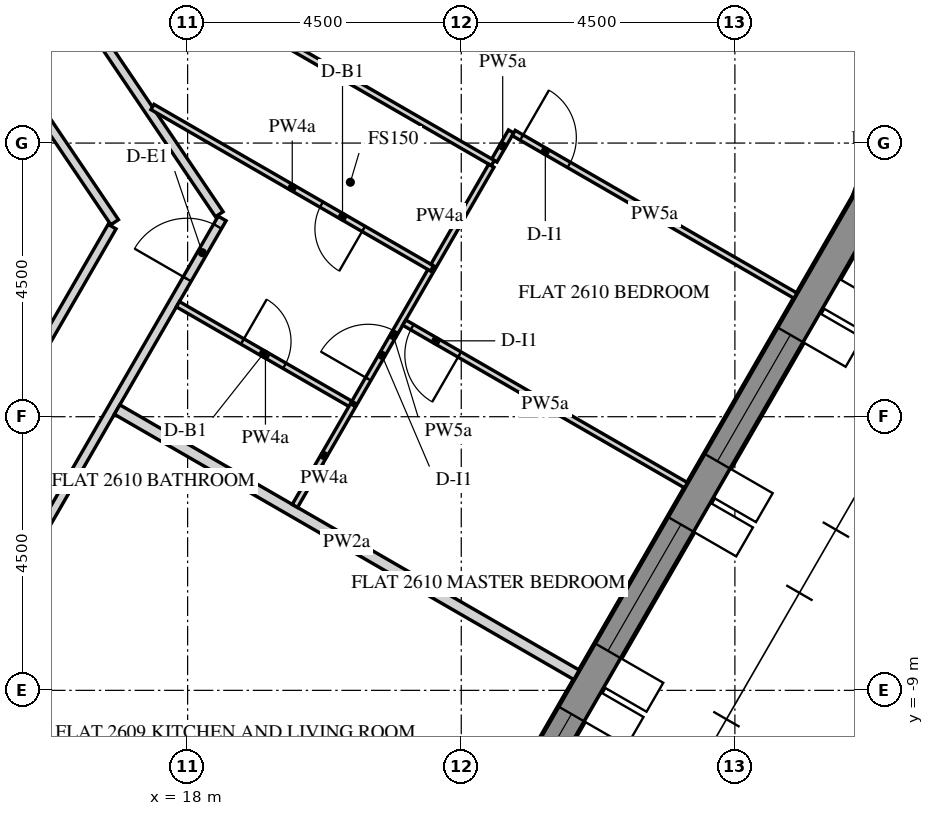
"""IFC4 building model, lengths in metres.
Left out: names, types, materials, properties, quantities, classifications, styles, units other than length and angle.
Written with IfcOpenShell. Run it as: python <this file> out.ifc"""

import sys

from ifc_helpers import new_model, si_unit, direction, frame, frame_2d, origin, place, context, subcontext, project, spatial, polyline, rectangle, outline, extrude, element, fill, save


model = new_model("IFC4")
c1 = context("Model", 3, precision=1e-05, world=origin(), true_north=direction((0.0, 1.0)))
c2 = subcontext(c1, "Body", "Model", "MODEL_VIEW")
j1 = project(units=[si_unit("LENGTHUNIT", "METRE"), si_unit("PLANEANGLEUNIT", "RADIAN")], contexts=[c1])
p1 = place(None, origin())
s1 = spatial("IfcSite", under=j1, at=p1, CompositionType="ELEMENT")
p2 = place(p1, origin())
s2 = spatial("IfcBuilding", under=s1, at=p2, CompositionType="ELEMENT")
p3 = place(p2, frame((0.0, 0.0, 326.4)))
s3 = spatial("IfcBuildingStorey", under=s2, at=p3, CompositionType="ELEMENT", Elevation=326.4)
p4 = place(p3, frame((16.451, -23.005, -0.15), z_axis=(0.0, 0.0, 1.0), x_axis=(0.500003737743, 0.866023245787, 0.0)))
e1 = element("IfcWall", 1, at=p4, inside=s3, PredefinedType="SOLIDWALL", context=c2, shape_type="SweptSolid", body=[
    extrude(outline(polyline([(-0.021, -0.25), (25.468, -0.25), (25.421, 0.25), (0.021, 0.25), (-0.021, -0.25)])), origin(), (0.0, 0.0, 1.0), 3.9),
])
p5 = place(p4, frame((2.522, 0.0, 0.75)))
e2 = element("IfcOpeningElement", 2, at=p5, cuts=e1, PredefinedType="OPENING", context=c2, shape_type="SweptSolid", body=[
    extrude(rectangle(XDim=2.4, YDim=2.7, at=frame_2d((1.2, 1.35))), frame((0.0, 0.26, 0.0), z_axis=(0.0, -1.0, 0.0), x_axis=(1.0, 0.0, 0.0)), (0.0, 0.0, 1.0), 0.52),
])
p6 = place(p4, frame((6.122, 0.0, 0.75)))
e3 = element("IfcOpeningElement", 3, at=p6, cuts=e1, PredefinedType="OPENING", context=c2, shape_type="SweptSolid", body=[
    extrude(rectangle(XDim=2.4, YDim=2.7, at=frame_2d((1.2, 1.35))), frame((0.0, 0.26, 0.0), z_axis=(0.0, -1.0, 0.0), x_axis=(1.0, 0.0, 0.0)), (0.0, 0.0, 1.0), 0.52),
])
p7 = place(p4, frame((9.722, 0.0, 0.75)))
e4 = element("IfcOpeningElement", 4, at=p7, cuts=e1, PredefinedType="OPENING", context=c2, shape_type="SweptSolid", body=[
    extrude(rectangle(XDim=2.4, YDim=2.7, at=frame_2d((1.2, 1.35))), frame((0.0, 0.26, 0.0), z_axis=(0.0, -1.0, 0.0), x_axis=(1.0, 0.0, 0.0)), (0.0, 0.0, 1.0), 0.52),
])
p8 = place(p4, frame((13.323, 0.0, 0.75)))
e5 = element("IfcOpeningElement", 5, at=p8, cuts=e1, PredefinedType="OPENING", context=c2, shape_type="SweptSolid", body=[
    extrude(rectangle(XDim=2.4, YDim=2.7, at=frame_2d((1.2, 1.35))), frame((0.0, 0.26, 0.0), z_axis=(0.0, -1.0, 0.0), x_axis=(1.0, 0.0, 0.0)), (0.0, 0.0, 1.0), 0.52),
])
p9 = place(p4, frame((16.922, 0.0, 0.75)))
e6 = element("IfcOpeningElement", 6, at=p9, cuts=e1, PredefinedType="OPENING", context=c2, shape_type="SweptSolid", body=[
    extrude(rectangle(XDim=2.4, YDim=2.7, at=frame_2d((1.2, 1.35))), frame((0.0, 0.26, 0.0), z_axis=(0.0, -1.0, 0.0), x_axis=(1.0, 0.0, 0.0)), (0.0, 0.0, 1.0), 0.52),
])
p10 = place(p4, frame((20.522, 0.0, 0.75)))
e7 = element("IfcOpeningElement", 7, at=p10, cuts=e1, PredefinedType="OPENING", context=c2, shape_type="SweptSolid", body=[
    extrude(rectangle(XDim=2.4, YDim=2.7, at=frame_2d((1.2, 1.35))), frame((0.0, 0.26, 0.0), z_axis=(0.0, -1.0, 0.0), x_axis=(1.0, 0.0, 0.0)), (0.0, 0.0, 1.0), 0.52),
])
p11 = place(p3, frame((29.174, -0.97, -0.15), z_axis=(0.0, 0.0, 1.0), x_axis=(0.330961348063, 0.943644311215, 0.0)))
e8 = element("IfcWall", 8, at=p11, inside=s3, PredefinedType="SOLIDWALL", context=c2, shape_type="SweptSolid", body=[
    extrude(outline(polyline([(-0.023, -0.25), (1.435, -0.25), (1.341, 0.25), (0.023, 0.25), (-0.023, -0.25)])), origin(), (0.0, 0.0, 1.0), 3.9),
])
p12 = place(p3, frame((11.229, -13.951, 0.0), z_axis=(0.0, 0.0, 1.0), x_axis=(0.499997948852, 0.866026588012, 0.0)))
e9 = element("IfcWall", 9, at=p12, inside=s3, PredefinedType="PARTITIONING", context=c2, shape_type="SweptSolid", body=[
    extrude(rectangle(XDim=14.677, YDim=0.15, at=frame_2d((7.339, 0.0))), origin(), (0.0, 0.0, 1.0), 2.838),
])
p13 = place(p12, frame((0.4, 0.0, 0.0)))
e10 = element("IfcOpeningElement", 10, at=p13, cuts=e9, PredefinedType="OPENING", context=c2, shape_type="SweptSolid", body=[
    extrude(rectangle(XDim=1.0, YDim=2.1, at=frame_2d((0.5, 1.05))), frame((0.0, 0.085, 0.0), z_axis=(0.0, -1.0, 0.0), x_axis=(1.0, 0.0, 0.0)), (0.0, 0.0, 1.0), 0.17),
])
p14 = place(p12, frame((13.527, 0.0, 0.0)))
e11 = element("IfcOpeningElement", 11, at=p14, cuts=e9, PredefinedType="OPENING", context=c2, shape_type="SweptSolid", body=[
    extrude(rectangle(XDim=1.0, YDim=2.1, at=frame_2d((0.5, 1.05))), frame((0.0, 0.085, 0.0), z_axis=(0.0, -1.0, 0.0), x_axis=(1.0, 0.0, 0.0)), (0.0, 0.0, 1.0), 0.17),
])
p15 = place(p3, frame((18.521, -1.171, 0.0), z_axis=(0.0, 0.0, 1.0), x_axis=(-0.559191021435, 0.829038842001, 0.0)))
e12 = element("IfcWall", 12, at=p15, inside=s3, PredefinedType="PARTITIONING", context=c2, shape_type="SweptSolid", body=[
    extrude(rectangle(XDim=16.605, YDim=0.15, at=frame_2d((8.303, 0.0))), origin(), (0.0, 0.0, 1.0), 2.838),
])
p16 = place(p15, frame((9.703, 0.0, 0.0)))
e13 = element("IfcOpeningElement", 13, at=p16, cuts=e12, PredefinedType="OPENING", context=c2, shape_type="SweptSolid", body=[
    extrude(rectangle(XDim=1.0, YDim=2.1, at=frame_2d((0.5, 1.05))), frame((0.0, 0.085, 0.0), z_axis=(0.0, -1.0, 0.0), x_axis=(1.0, 0.0, 0.0)), (0.0, 0.0, 1.0), 0.17),
])
p17 = place(p3, frame((12.106, 5.657, 0.0), z_axis=(0.0, 0.0, 1.0), x_axis=(0.559202573837, -0.829031049728, 0.0)))
e14 = element("IfcWall", 14, at=p17, inside=s3, PredefinedType="PARTITIONING", context=c2, shape_type="SweptSolid", body=[
    extrude(rectangle(XDim=8.394, YDim=0.15, at=frame_2d((4.197, 0.0))), origin(), (0.0, 0.0, 1.0), 2.838),
])
p18 = place(p17, frame((3.747, 0.0, 0.0)))
e15 = element("IfcOpeningElement", 15, at=p18, cuts=e14, PredefinedType="OPENING", context=c2, shape_type="SweptSolid", body=[
    extrude(rectangle(XDim=0.9, YDim=2.1, at=frame_2d((0.45, 1.05))), frame((0.0, 0.085, 0.0), z_axis=(0.0, -1.0, 0.0), x_axis=(1.0, 0.0, 0.0)), (0.0, 0.0, 1.0), 0.17),
])
p19 = place(p3, frame((16.758, -1.374, 0.0), z_axis=(0.0, 0.0, 1.0), x_axis=(-0.499980689202, -0.866036552592, 0.0)))
e16 = element("IfcWall", 16, at=p19, inside=s3, PredefinedType="PARTITIONING", context=c2, shape_type="SweptSolid", body=[
    extrude(rectangle(XDim=6.111, YDim=0.15, at=frame_2d((3.055, 0.0))), origin(), (0.0, 0.0, 1.0), 2.838),
])
p20 = place(p3, frame((24.396, -8.745, 0.0), z_axis=(0.0, 0.0, 1.0), x_axis=(-0.866018297078, 0.500012308975, 0.0)))
e17 = element("IfcWall", 17, at=p20, inside=s3, PredefinedType="PARTITIONING", context=c2, shape_type="SweptSolid", body=[
    extrude(rectangle(XDim=8.725, YDim=0.18, at=frame_2d((4.362, 0.0))), origin(), (0.0, 0.0, 1.0), 2.838),
])
p21 = place(p3, frame((23.043, -0.287, 0.0), z_axis=(0.0, 0.0, 1.0), x_axis=(0.500181810019, 0.865920410272, 0.0)))
e18 = element("IfcWall", 18, at=p21, inside=s3, PredefinedType="PARTITIONING", context=c2, shape_type="SweptSolid", body=[
    extrude(rectangle(XDim=0.552, YDim=0.1, at=frame_2d((0.276, 0.0))), origin(), (0.0, 0.0, 1.0), 2.838),
])
p22 = place(p3, frame((23.363, 0.166, 0.0), z_axis=(0.0, 0.0, 1.0), x_axis=(0.866024483152, -0.500001594578, 0.0)))
e19 = element("IfcWall", 19, at=p22, inside=s3, PredefinedType="PARTITIONING", context=c2, shape_type="SweptSolid", body=[
    extrude(rectangle(XDim=5.35, YDim=0.1, at=frame_2d((2.675, 0.0))), origin(), (0.0, 0.0, 1.0), 2.838),
])
p23 = place(p22, frame((0.15, 0.0, 0.0)))
e20 = element("IfcOpeningElement", 20, at=p23, cuts=e19, PredefinedType="OPENING", context=c2, shape_type="SweptSolid", body=[
    extrude(rectangle(XDim=0.9, YDim=2.1, at=frame_2d((0.45, 1.05))), frame((0.0, 0.06, 0.0), z_axis=(0.0, -1.0, 0.0), x_axis=(1.0, 0.0, 0.0)), (0.0, 0.0, 1.0), 0.12),
])
p24 = place(p3, frame((14.896, 4.361, 0.0), z_axis=(0.0, 0.0, 1.0), x_axis=(0.866020874699, -0.500007844523, 0.0)))
e21 = element("IfcWall", 21, at=p24, inside=s3, PredefinedType="PARTITIONING", context=c2, shape_type="SweptSolid", body=[
    extrude(rectangle(XDim=9.38, YDim=0.1, at=frame_2d((4.69, 0.0))), origin(), (0.0, 0.0, 1.0), 2.838),
])
p25 = place(p3, frame((17.84, -2.65, 0.0), z_axis=(0.0, 0.0, 1.0), x_axis=(0.866002163101, -0.500040251884, 0.0)))
e22 = element("IfcWall", 22, at=p25, inside=s3, PredefinedType="PARTITIONING", context=c2, shape_type="SweptSolid", body=[
    extrude(rectangle(XDim=3.325, YDim=0.1, at=frame_2d((1.663, 0.0))), origin(), (0.0, 0.0, 1.0), 2.838),
])
p26 = place(p25, frame((1.225, 0.0, 0.0)))
e23 = element("IfcOpeningElement", 23, at=p26, cuts=e22, PredefinedType="OPENING", context=c2, shape_type="SweptSolid", body=[
    extrude(rectangle(XDim=0.8, YDim=2.1, at=frame_2d((0.4, 1.05))), frame((0.0, 0.06, 0.0), z_axis=(0.0, -1.0, 0.0), x_axis=(1.0, 0.0, 0.0)), (0.0, 0.0, 1.0), 0.12),
])
p27 = place(p3, frame((20.743, -4.271, 0.0), z_axis=(0.0, 0.0, 1.0), x_axis=(0.500014808323, 0.866016854026, 0.0)))
e24 = element("IfcWall", 24, at=p27, inside=s3, PredefinedType="PARTITIONING", context=c2, shape_type="SweptSolid", body=[
    extrude(rectangle(XDim=2.554, YDim=0.1, at=frame_2d((1.277, 0.0))), origin(), (0.0, 0.0, 1.0), 2.838),
])
p28 = place(p27, frame((0.452, 0.0, 0.0)))
e25 = element("IfcOpeningElement", 25, at=p28, cuts=e24, PredefinedType="OPENING", context=c2, shape_type="SweptSolid", body=[
    extrude(rectangle(XDim=0.9, YDim=2.1, at=frame_2d((0.45, 1.05))), frame((0.0, 0.06, 0.0), z_axis=(0.0, -1.0, 0.0), x_axis=(1.0, 0.0, 0.0)), (0.0, 0.0, 1.0), 0.12),
])
p29 = place(p3, frame((22.02, -2.061, 0.0), z_axis=(0.0, 0.0, 1.0), x_axis=(-0.866041630335, 0.499971893737, 0.0)))
e26 = element("IfcWall", 26, at=p29, inside=s3, PredefinedType="PARTITIONING", context=c2, shape_type="SweptSolid", body=[
    extrude(rectangle(XDim=5.309, YDim=0.1, at=frame_2d((2.655, 0.0))), origin(), (0.0, 0.0, 1.0), 2.838),
])
p30 = place(p29, frame((1.3, 0.0, 0.0)))
e27 = element("IfcOpeningElement", 27, at=p30, cuts=e26, PredefinedType="OPENING", context=c2, shape_type="SweptSolid", body=[
    extrude(rectangle(XDim=0.8, YDim=2.1, at=frame_2d((0.4, 1.05))), frame((0.0, 0.06, 0.0), z_axis=(0.0, -1.0, 0.0), x_axis=(1.0, 0.0, 0.0)), (0.0, 0.0, 1.0), 0.12),
])
p31 = place(p3, frame((19.764, -5.967, 0.0), z_axis=(0.0, 0.0, 1.0), x_axis=(0.500039310002, 0.866002706955, 0.0)))
e28 = element("IfcWall", 28, at=p31, inside=s3, PredefinedType="PARTITIONING", context=c2, shape_type="SweptSolid", body=[
    extrude(rectangle(XDim=1.912, YDim=0.1, at=frame_2d((0.956, 0.0))), origin(), (0.0, 0.0, 1.0), 2.838),
])
p32 = place(p3, frame((26.196, -5.627, 0.0), z_axis=(0.0, 0.0, 1.0), x_axis=(-0.866024483152, 0.500001594578, 0.0)))
e29 = element("IfcWall", 29, at=p32, inside=s3, PredefinedType="PARTITIONING", context=c2, shape_type="SweptSolid", body=[
    extrude(rectangle(XDim=5.35, YDim=0.1, at=frame_2d((2.675, 0.0))), origin(), (0.0, 0.0, 1.0), 2.838),
])
p33 = place(p32, frame((4.3, 0.0, 0.0)))
e30 = element("IfcOpeningElement", 30, at=p33, cuts=e29, PredefinedType="OPENING", context=c2, shape_type="SweptSolid", body=[
    extrude(rectangle(XDim=0.9, YDim=2.1, at=frame_2d((0.45, 1.05))), frame((0.0, 0.06, 0.0), z_axis=(0.0, -1.0, 0.0), x_axis=(1.0, 0.0, 0.0)), (0.0, 0.0, 1.0), 0.12),
])
p34 = place(p3, frame((22.995, -0.372, 0.0), z_axis=(0.0, 0.0, 1.0), x_axis=(-0.500063520245, -0.865988727248, 0.0)))
e31 = element("IfcWall", 31, at=p34, inside=s3, PredefinedType="PARTITIONING", context=c2, shape_type="SweptSolid", body=[
    extrude(rectangle(XDim=1.9, YDim=0.1, at=frame_2d((0.95, 0.0))), origin(), (0.0, 0.0, 1.0), 2.838),
])
p35 = place(p8, frame((0.0, 0.18, 0.0)))
e32 = element("IfcWindow", 32, at=p35, inside=s3, PartitioningType="DOUBLE_PANEL_VERTICAL", PredefinedType="WINDOW", context=c2, shape_type="SweptSolid", body=[
    extrude(rectangle(XDim=2.4, YDim=2.7, at=frame_2d((1.2, 1.35))), frame((0.0, 0.03, 0.0), z_axis=(0.0, -1.0, 0.0), x_axis=(1.0, 0.0, 0.0)), (0.0, 0.0, 1.0), 0.06),
])
fill(e5, e32)
p36 = place(p9, frame((0.0, 0.18, 0.0)))
e33 = element("IfcWindow", 33, at=p36, inside=s3, PartitioningType="DOUBLE_PANEL_VERTICAL", PredefinedType="WINDOW", context=c2, shape_type="SweptSolid", body=[
    extrude(rectangle(XDim=2.4, YDim=2.7, at=frame_2d((1.2, 1.35))), frame((0.0, 0.03, 0.0), z_axis=(0.0, -1.0, 0.0), x_axis=(1.0, 0.0, 0.0)), (0.0, 0.0, 1.0), 0.06),
])
fill(e6, e33)
p37 = place(p10, frame((0.0, 0.18, 0.0)))
e34 = element("IfcWindow", 34, at=p37, inside=s3, PartitioningType="DOUBLE_PANEL_VERTICAL", PredefinedType="WINDOW", context=c2, shape_type="SweptSolid", body=[
    extrude(rectangle(XDim=2.4, YDim=2.7, at=frame_2d((1.2, 1.35))), frame((0.0, 0.03, 0.0), z_axis=(0.0, -1.0, 0.0), x_axis=(1.0, 0.0, 0.0)), (0.0, 0.0, 1.0), 0.06),
])
fill(e7, e34)
p38 = place(p14, origin())
e35 = element("IfcDoor", 35, at=p38, inside=s3, OperationType="SINGLE_SWING_LEFT", PredefinedType="DOOR", context=c2, shape_type="SweptSolid", body=[
    extrude(rectangle(XDim=1.0, YDim=2.1, at=frame_2d((0.5, 1.05))), frame((0.0, 0.025, 0.0), z_axis=(0.0, -1.0, 0.0), x_axis=(1.0, 0.0, 0.0)), (0.0, 0.0, 1.0), 0.05),
])
fill(e11, e35)
p39 = place(p26, origin())
e36 = element("IfcDoor", 36, at=p39, inside=s3, OperationType="SINGLE_SWING_RIGHT", PredefinedType="DOOR", context=c2, shape_type="SweptSolid", body=[
    extrude(rectangle(XDim=0.8, YDim=2.1, at=frame_2d((0.4, 1.05))), frame((0.0, 0.025, 0.0), z_axis=(0.0, -1.0, 0.0), x_axis=(1.0, 0.0, 0.0)), (0.0, 0.0, 1.0), 0.05),
])
fill(e23, e36)
p40 = place(p28, origin())
e37 = element("IfcDoor", 37, at=p40, inside=s3, OperationType="SINGLE_SWING_LEFT", PredefinedType="DOOR", context=c2, shape_type="SweptSolid", body=[
    extrude(rectangle(XDim=0.9, YDim=2.1, at=frame_2d((0.45, 1.05))), frame((0.0, 0.025, 0.0), z_axis=(0.0, -1.0, 0.0), x_axis=(1.0, 0.0, 0.0)), (0.0, 0.0, 1.0), 0.05),
])
fill(e25, e37)
p41 = place(p33, origin())
e38 = element("IfcDoor", 38, at=p41, inside=s3, OperationType="SINGLE_SWING_RIGHT", PredefinedType="DOOR", context=c2, shape_type="SweptSolid", body=[
    extrude(rectangle(XDim=0.9, YDim=2.1, at=frame_2d((0.45, 1.05))), frame((0.0, 0.025, 0.0), z_axis=(0.0, -1.0, 0.0), x_axis=(1.0, 0.0, 0.0)), (0.0, 0.0, 1.0), 0.05),
])
fill(e30, e38)
p42 = place(p23, origin())
e39 = element("IfcDoor", 39, at=p42, inside=s3, OperationType="SINGLE_SWING_RIGHT", PredefinedType="DOOR", context=c2, shape_type="SweptSolid", body=[
    extrude(rectangle(XDim=0.9, YDim=2.1, at=frame_2d((0.45, 1.05))), frame((0.0, 0.025, 0.0), z_axis=(0.0, -1.0, 0.0), x_axis=(1.0, 0.0, 0.0)), (0.0, 0.0, 1.0), 0.05),
])
fill(e20, e39)
p43 = place(p30, origin())
e40 = element("IfcDoor", 40, at=p43, inside=s3, OperationType="SINGLE_SWING_RIGHT", PredefinedType="DOOR", context=c2, shape_type="SweptSolid", body=[
    extrude(rectangle(XDim=0.8, YDim=2.1, at=frame_2d((0.4, 1.05))), frame((0.0, 0.025, 0.0), z_axis=(0.0, -1.0, 0.0), x_axis=(1.0, 0.0, 0.0)), (0.0, 0.0, 1.0), 0.05),
])
fill(e27, e40)
save(model, sys.argv[1])
